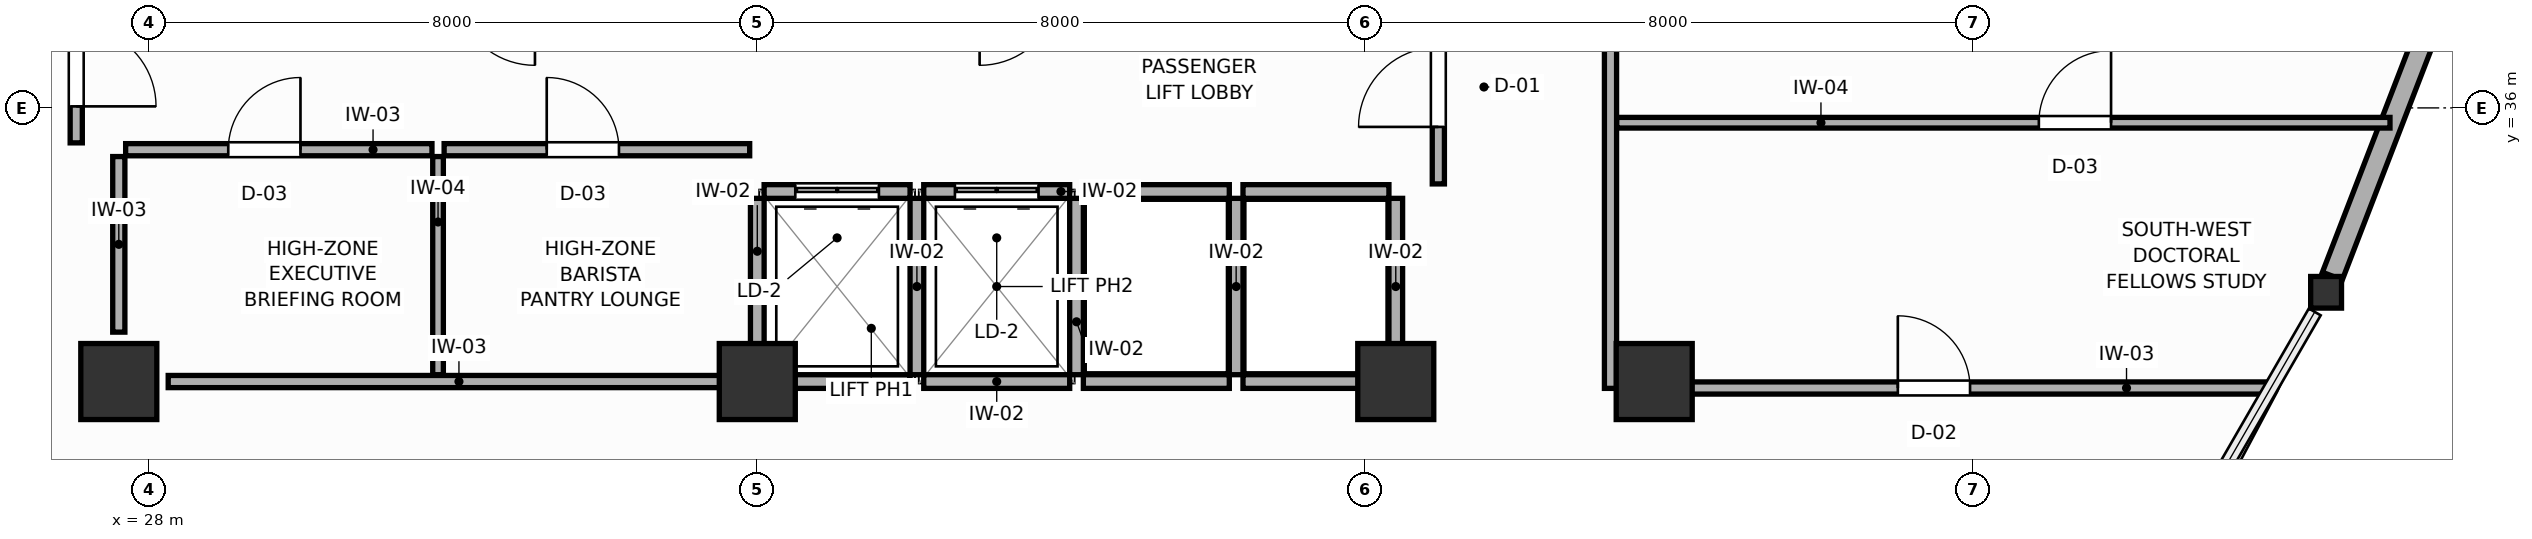
"""IFC4 building model, lengths in metres.
Left out: names, types, materials, properties, quantities, classifications, styles, units other than length and angle.
Written with IfcOpenShell. Run it as: python <this file> out.ifc"""

import sys

from ifc_helpers import new_model, si_unit, direction, frame, frame_2d, origin, origin_2d, place, context, subcontext, project, spatial, rectangle, i_section, extrude, source, transform, mapped, element, fill, save


model = new_model("IFC4")
c1 = context("Model", 3, precision=1e-05, world=origin(), true_north=direction((0.0, 1.0)))
c2 = subcontext(c1, "Body", "Model", "MODEL_VIEW")
j1 = project(units=[si_unit("LENGTHUNIT", "METRE"), si_unit("PLANEANGLEUNIT", "RADIAN")], contexts=[c1])
p1 = place(None, origin())
s1 = spatial("IfcSite", under=j1, at=p1, CompositionType="ELEMENT")
p2 = place(p1, origin())
s2 = spatial("IfcBuilding", under=s1, at=p2, CompositionType="ELEMENT")
p3 = place(p2, frame((0.0, 0.0, 220.2)))
s3 = spatial("IfcBuildingStorey", under=s2, at=p3, CompositionType="ELEMENT", Elevation=220.2)
m1 = source(origin(), c2, "Body", "SweptSolid", [
    extrude(rectangle(XDim=1.0, YDim=1.0, at=origin_2d()), origin(), (0.0, 0.0, 1.0), 3.6),
])
for number, where, z_axis, x_axis in (
    (1, (27.6, 32.4, 0.0), (0.0, 0.0, 1.0), (1.0, 0.0, 0.0)),
    (2, (44.4, 32.4, 0.0), (0.0, 0.0, 1.0), (1.0, 0.0, 0.0)),
    (3, (36.0, 32.4, 0.0), (0.0, 0.0, 1.0), (1.0, 0.0, 0.0)),
    (4, (47.8, 32.4, 0.0), (0.0, 0.0, 1.0), (1.0, 0.0, 0.0)),
):
    element("IfcColumn", number, at=place(p3, frame(where, z_axis=z_axis, x_axis=x_axis)), inside=s3, PredefinedType="COLUMN", context=c2, shape_type="MappedRepresentation", body=[
        mapped(m1, transform((0.0, 0.0, 0.0), scale=1.0)),
    ])
m2 = source(origin(), c2, "Body", "SweptSolid", [
    extrude(i_section(OverallWidth=0.406, OverallDepth=0.416, WebThickness=0.027, FlangeThickness=0.044, FilletRadius=0.015, at=origin_2d()), origin(), (0.0, 0.0, 1.0), 3.6),
])
p4 = place(p3, frame((56.639, 33.574, 0.0), z_axis=(0.0, 0.0, 1.0), x_axis=(1.0, 0.0, 0.0)))
e5 = element("IfcColumn", 5, at=p4, inside=s3, PredefinedType="COLUMN", context=c2, shape_type="MappedRepresentation", body=[
    mapped(m2, transform((0.0, 0.0, 0.0), scale=1.0)),
])
p5 = place(p3, frame((56.722, 33.787, 0.0), z_axis=(0.0, 0.0, 1.0), x_axis=(0.359972142588, 0.932963052088, 0.0)))
e6 = element("IfcWall", 6, at=p5, inside=s3, PredefinedType="SOLIDWALL", context=c2, shape_type="SweptSolid", body=[
    extrude(rectangle(XDim=13.621, YDim=0.28, at=frame_2d((6.811, 0.0))), origin(), (0.0, 0.0, 1.0), 3.02),
])
p6 = place(p5, frame((6.086, 0.0, 0.75)))
e7 = element("IfcOpeningElement", 7, at=p6, cuts=e6, PredefinedType="OPENING", context=c2, shape_type="SweptSolid", body=[
    extrude(rectangle(XDim=1.45, YDim=1.65, at=frame_2d((0.725, 0.825))), frame((0.0, 0.15, 0.0), z_axis=(0.0, -1.0, 0.0), x_axis=(1.0, 0.0, 0.0)), (0.0, 0.0, 1.0), 0.3),
])
p7 = place(p3, frame((36.09, 34.9, 0.0), z_axis=(0.0, 0.0, 1.0), x_axis=(1.0, 0.0, 0.0)))
e8 = element("IfcWall", 8, at=p7, inside=s3, PredefinedType="PARTITIONING", context=c2, shape_type="SweptSolid", body=[
    extrude(rectangle(XDim=1.92, YDim=0.18, at=frame_2d((0.96, 0.0))), origin(), (0.0, 0.0, 1.0), 3.41),
])
p8 = place(p7, frame((0.41, 0.0, 0.0)))
e9 = element("IfcOpeningElement", 9, at=p8, cuts=e8, PredefinedType="OPENING", context=c2, shape_type="SweptSolid", body=[
    extrude(rectangle(XDim=1.1, YDim=2.1, at=frame_2d((0.55, 1.05))), frame((0.0, 0.1, 0.0), z_axis=(0.0, -1.0, 0.0), x_axis=(1.0, 0.0, 0.0)), (0.0, 0.0, 1.0), 0.2),
])
p9 = place(p3, frame((36.09, 32.4, 0.0), z_axis=(0.0, 0.0, 1.0), x_axis=(1.0, 0.0, 0.0)))
e10 = element("IfcWall", 10, at=p9, inside=s3, PredefinedType="PARTITIONING", context=c2, shape_type="SweptSolid", body=[
    extrude(rectangle(XDim=1.92, YDim=0.18, at=frame_2d((0.96, 0.0))), origin(), (0.0, 0.0, 1.0), 2.96),
])
p10 = place(p3, frame((36.0, 32.49, 0.0), z_axis=(0.0, 0.0, 1.0), x_axis=(0.0, 1.0, 0.0)))
e11 = element("IfcWall", 11, at=p10, inside=s3, PredefinedType="PARTITIONING", context=c2, shape_type="SweptSolid", body=[
    extrude(rectangle(XDim=2.32, YDim=0.18, at=frame_2d((1.16, 0.0))), origin(), (0.0, 0.0, 1.0), 3.41),
])
p11 = place(p3, frame((38.19, 34.9, 0.0), z_axis=(0.0, 0.0, 1.0), x_axis=(1.0, 0.0, 0.0)))
e12 = element("IfcWall", 12, at=p11, inside=s3, PredefinedType="PARTITIONING", context=c2, shape_type="SweptSolid", body=[
    extrude(rectangle(XDim=1.92, YDim=0.18, at=frame_2d((0.96, 0.0))), origin(), (0.0, 0.0, 1.0), 3.41),
])
p12 = place(p11, frame((0.41, 0.0, 0.0)))
e13 = element("IfcOpeningElement", 13, at=p12, cuts=e12, PredefinedType="OPENING", context=c2, shape_type="SweptSolid", body=[
    extrude(rectangle(XDim=1.1, YDim=2.1, at=frame_2d((0.55, 1.05))), frame((0.0, 0.1, 0.0), z_axis=(0.0, -1.0, 0.0), x_axis=(1.0, 0.0, 0.0)), (0.0, 0.0, 1.0), 0.2),
])
p13 = place(p3, frame((38.19, 32.4, 0.0), z_axis=(0.0, 0.0, 1.0), x_axis=(1.0, 0.0, 0.0)))
e14 = element("IfcWall", 14, at=p13, inside=s3, PredefinedType="PARTITIONING", context=c2, shape_type="SweptSolid", body=[
    extrude(rectangle(XDim=1.92, YDim=0.18, at=frame_2d((0.96, 0.0))), origin(), (0.0, 0.0, 1.0), 2.96),
])
p14 = place(p3, frame((38.1, 32.49, 0.0), z_axis=(0.0, 0.0, 1.0), x_axis=(0.0, 1.0, 0.0)))
e15 = element("IfcWall", 15, at=p14, inside=s3, PredefinedType="PARTITIONING", context=c2, shape_type="SweptSolid", body=[
    extrude(rectangle(XDim=2.32, YDim=0.18, at=frame_2d((1.16, 0.0))), origin(), (0.0, 0.0, 1.0), 3.41),
])
p15 = place(p3, frame((40.29, 34.9, 0.0), z_axis=(0.0, 0.0, 1.0), x_axis=(1.0, 0.0, 0.0)))
e16 = element("IfcWall", 16, at=p15, inside=s3, PredefinedType="PARTITIONING", context=c2, shape_type="SweptSolid", body=[
    extrude(rectangle(XDim=1.92, YDim=0.18, at=frame_2d((0.96, 0.0))), origin(), (0.0, 0.0, 1.0), 3.41),
])
p16 = place(p3, frame((40.29, 32.4, 0.0), z_axis=(0.0, 0.0, 1.0), x_axis=(1.0, 0.0, 0.0)))
e17 = element("IfcWall", 17, at=p16, inside=s3, PredefinedType="PARTITIONING", context=c2, shape_type="SweptSolid", body=[
    extrude(rectangle(XDim=1.92, YDim=0.18, at=frame_2d((0.96, 0.0))), origin(), (0.0, 0.0, 1.0), 2.96),
])
p17 = place(p3, frame((40.2, 32.49, 0.0), z_axis=(0.0, 0.0, 1.0), x_axis=(0.0, 1.0, 0.0)))
e18 = element("IfcWall", 18, at=p17, inside=s3, PredefinedType="PARTITIONING", context=c2, shape_type="SweptSolid", body=[
    extrude(rectangle(XDim=2.32, YDim=0.18, at=frame_2d((1.16, 0.0))), origin(), (0.0, 0.0, 1.0), 3.41),
])
p18 = place(p3, frame((42.39, 34.9, 0.0), z_axis=(0.0, 0.0, 1.0), x_axis=(1.0, 0.0, 0.0)))
e19 = element("IfcWall", 19, at=p18, inside=s3, PredefinedType="PARTITIONING", context=c2, shape_type="SweptSolid", body=[
    extrude(rectangle(XDim=1.92, YDim=0.18, at=frame_2d((0.96, 0.0))), origin(), (0.0, 0.0, 1.0), 3.41),
])
p19 = place(p3, frame((42.39, 32.4, 0.0), z_axis=(0.0, 0.0, 1.0), x_axis=(1.0, 0.0, 0.0)))
e20 = element("IfcWall", 20, at=p19, inside=s3, PredefinedType="PARTITIONING", context=c2, shape_type="SweptSolid", body=[
    extrude(rectangle(XDim=1.92, YDim=0.18, at=frame_2d((0.96, 0.0))), origin(), (0.0, 0.0, 1.0), 2.96),
])
for number, where, z_axis, x_axis in (
    (21, (42.3, 32.49, 0.0), (0.0, 0.0, 1.0), (0.0, 1.0, 0.0)),
    (22, (44.4, 32.49, 0.0), (0.0, 0.0, 1.0), (0.0, 1.0, 0.0)),
):
    element("IfcWall", number, at=place(p3, frame(where, z_axis=z_axis, x_axis=x_axis)), inside=s3, PredefinedType="PARTITIONING", context=c2, shape_type="SweptSolid", body=[
        extrude(rectangle(XDim=2.32, YDim=0.18, at=frame_2d((1.16, 0.0))), origin(), (0.0, 0.0, 1.0), 3.41),
    ])
p20 = place(p3, frame((28.25, 32.4, 0.0), z_axis=(0.0, 0.0, 1.0), x_axis=(1.0, 0.0, 0.0)))
e23 = element("IfcWall", 23, at=p20, inside=s3, PredefinedType="PARTITIONING", context=c2, shape_type="SweptSolid", body=[
    extrude(rectangle(XDim=7.65, YDim=0.16, at=frame_2d((3.825, 0.0))), origin(), (0.0, 0.0, 1.0), 2.96),
])
p21 = place(p3, frame((27.6, 33.05, 0.0), z_axis=(0.0, 0.0, 1.0), x_axis=(0.0, 1.0, 0.0)))
e24 = element("IfcWall", 24, at=p21, inside=s3, PredefinedType="PARTITIONING", context=c2, shape_type="SweptSolid", body=[
    extrude(rectangle(XDim=2.31, YDim=0.16, at=frame_2d((1.155, 0.0))), origin(), (0.0, 0.0, 1.0), 3.41),
])
p22 = place(p3, frame((31.8, 32.49, 0.0), z_axis=(0.0, 0.0, 1.0), x_axis=(0.0, 1.0, 0.0)))
e25 = element("IfcWall", 25, at=p22, inside=s3, PredefinedType="PARTITIONING", context=c2, shape_type="SweptSolid", body=[
    extrude(rectangle(XDim=2.87, YDim=0.14, at=frame_2d((1.435, 0.0))), origin(), (0.0, 0.0, 1.0), 3.41),
])
p23 = place(p3, frame((27.69, 35.45, 0.0), z_axis=(0.0, 0.0, 1.0), x_axis=(1.0, 0.0, 0.0)))
e26 = element("IfcWall", 26, at=p23, inside=s3, PredefinedType="PARTITIONING", context=c2, shape_type="SweptSolid", body=[
    extrude(rectangle(XDim=4.03, YDim=0.16, at=frame_2d((2.015, 0.0))), origin(), (0.0, 0.0, 1.0), 3.41),
])
p24 = place(p23, frame((1.35, 0.0, 0.0)))
e27 = element("IfcOpeningElement", 27, at=p24, cuts=e26, PredefinedType="OPENING", context=c2, shape_type="SweptSolid", body=[
    extrude(rectangle(XDim=0.95, YDim=2.05, at=frame_2d((0.475, 1.025))), frame((0.0, 0.09, 0.0), z_axis=(0.0, -1.0, 0.0), x_axis=(1.0, 0.0, 0.0)), (0.0, 0.0, 1.0), 0.18),
])
p25 = place(p3, frame((31.88, 35.45, 0.0), z_axis=(0.0, 0.0, 1.0), x_axis=(1.0, 0.0, 0.0)))
e28 = element("IfcWall", 28, at=p25, inside=s3, PredefinedType="PARTITIONING", context=c2, shape_type="SweptSolid", body=[
    extrude(rectangle(XDim=4.02, YDim=0.16, at=frame_2d((2.01, 0.0))), origin(), (0.0, 0.0, 1.0), 3.41),
])
p26 = place(p25, frame((1.35, 0.0, 0.0)))
e29 = element("IfcOpeningElement", 29, at=p26, cuts=e28, PredefinedType="OPENING", context=c2, shape_type="SweptSolid", body=[
    extrude(rectangle(XDim=0.95, YDim=2.05, at=frame_2d((0.475, 1.025))), frame((0.0, 0.09, 0.0), z_axis=(0.0, -1.0, 0.0), x_axis=(1.0, 0.0, 0.0)), (0.0, 0.0, 1.0), 0.18),
])
p27 = place(p3, frame((27.04, 35.54, 0.0), z_axis=(0.0, 0.0, 1.0), x_axis=(0.0, 1.0, 0.0)))
e30 = element("IfcWall", 30, at=p27, inside=s3, PredefinedType="PARTITIONING", context=c2, shape_type="SweptSolid", body=[
    extrude(rectangle(XDim=2.11, YDim=0.16, at=frame_2d((1.055, 0.0))), origin(), (0.0, 0.0, 1.0), 3.41),
])
p28 = place(p27, frame((0.48, 0.0, 0.0)))
e31 = element("IfcOpeningElement", 31, at=p28, cuts=e30, PredefinedType="OPENING", context=c2, shape_type="SweptSolid", body=[
    extrude(rectangle(XDim=1.05, YDim=2.1, at=frame_2d((0.525, 1.05))), frame((0.0, 0.09, 0.0), z_axis=(0.0, -1.0, 0.0), x_axis=(1.0, 0.0, 0.0)), (0.0, 0.0, 1.0), 0.18),
])
p29 = place(p3, frame((44.96, 35.0, 0.0), z_axis=(0.0, 0.0, 1.0), x_axis=(0.0, 1.0, 0.0)))
e32 = element("IfcWall", 32, at=p29, inside=s3, PredefinedType="PARTITIONING", context=c2, shape_type="SweptSolid", body=[
    extrude(rectangle(XDim=2.65, YDim=0.16, at=frame_2d((1.325, 0.0))), origin(), (0.0, 0.0, 1.0), 3.41),
])
p30 = place(p29, frame((0.75, 0.0, 0.0)))
e33 = element("IfcOpeningElement", 33, at=p30, cuts=e32, PredefinedType="OPENING", context=c2, shape_type="SweptSolid", body=[
    extrude(rectangle(XDim=1.05, YDim=2.1, at=frame_2d((0.525, 1.05))), frame((0.0, 0.09, 0.0), z_axis=(0.0, -1.0, 0.0), x_axis=(1.0, 0.0, 0.0)), (0.0, 0.0, 1.0), 0.18),
])
p31 = place(p3, frame((47.225, 32.31, 0.0), z_axis=(0.0, 0.0, 1.0), x_axis=(0.0, 1.0, 0.0)))
e34 = element("IfcWall", 34, at=p31, inside=s3, PredefinedType="PARTITIONING", context=c2, shape_type="SweptSolid", body=[
    extrude(rectangle(XDim=18.978, YDim=0.16, at=frame_2d((9.489, 0.0))), origin(), (0.0, 0.0, 1.0), 3.41),
])
p32 = place(p3, frame((47.307, 32.315, 0.0), z_axis=(0.0, 0.0, 1.0), x_axis=(1.0, 0.0, 0.0)))
e35 = element("IfcWall", 35, at=p32, inside=s3, PredefinedType="PARTITIONING", context=c2, shape_type="SweptSolid", body=[
    extrude(rectangle(XDim=8.586, YDim=0.16, at=frame_2d((4.293, 0.0))), origin(), (0.0, 0.0, 1.0), 2.96),
])
p33 = place(p32, frame((3.698, 0.0, 0.0)))
e36 = element("IfcOpeningElement", 36, at=p33, cuts=e35, PredefinedType="OPENING", context=c2, shape_type="SweptSolid", body=[
    extrude(rectangle(XDim=0.95, YDim=2.05, at=frame_2d((0.475, 1.025))), frame((0.0, 0.09, 0.0), z_axis=(0.0, -1.0, 0.0), x_axis=(1.0, 0.0, 0.0)), (0.0, 0.0, 1.0), 0.18),
])
p34 = place(p3, frame((47.307, 35.805, 0.0), z_axis=(0.0, 0.0, 1.0), x_axis=(1.0, 0.0, 0.0)))
e37 = element("IfcWall", 37, at=p34, inside=s3, PredefinedType="PARTITIONING", context=c2, shape_type="SweptSolid", body=[
    extrude(rectangle(XDim=10.173, YDim=0.14, at=frame_2d((5.087, 0.0))), origin(), (0.0, 0.0, 1.0), 3.41),
])
p35 = place(p34, frame((5.553, 0.0, 0.0)))
e38 = element("IfcOpeningElement", 38, at=p35, cuts=e37, PredefinedType="OPENING", context=c2, shape_type="SweptSolid", body=[
    extrude(rectangle(XDim=0.95, YDim=2.05, at=frame_2d((0.475, 1.025))), frame((0.0, 0.08, 0.0), z_axis=(0.0, -1.0, 0.0), x_axis=(1.0, 0.0, 0.0)), (0.0, 0.0, 1.0), 0.16),
])
p36 = place(p8, origin())
e39 = element("IfcDoor", 39, at=p36, inside=s3, OperationType="DOUBLE_DOOR_SLIDING", PredefinedType="DOOR", context=c2, shape_type="SweptSolid", body=[
    extrude(rectangle(XDim=1.1, YDim=2.1, at=frame_2d((0.55, 1.05))), frame((0.0, 0.025, 0.0), z_axis=(0.0, -1.0, 0.0), x_axis=(1.0, 0.0, 0.0)), (0.0, 0.0, 1.0), 0.05),
])
fill(e9, e39)
p37 = place(p12, origin())
e40 = element("IfcDoor", 40, at=p37, inside=s3, OperationType="DOUBLE_DOOR_SLIDING", PredefinedType="DOOR", context=c2, shape_type="SweptSolid", body=[
    extrude(rectangle(XDim=1.1, YDim=2.1, at=frame_2d((0.55, 1.05))), frame((0.0, 0.025, 0.0), z_axis=(0.0, -1.0, 0.0), x_axis=(1.0, 0.0, 0.0)), (0.0, 0.0, 1.0), 0.05),
])
fill(e13, e40)
p38 = place(p24, origin())
e41 = element("IfcDoor", 41, at=p38, inside=s3, OperationType="SINGLE_SWING_RIGHT", PredefinedType="DOOR", context=c2, shape_type="SweptSolid", body=[
    extrude(rectangle(XDim=0.95, YDim=2.05, at=frame_2d((0.475, 1.025))), frame((0.0, 0.025, 0.0), z_axis=(0.0, -1.0, 0.0), x_axis=(1.0, 0.0, 0.0)), (0.0, 0.0, 1.0), 0.05),
])
fill(e27, e41)
p39 = place(p26, origin())
e42 = element("IfcDoor", 42, at=p39, inside=s3, OperationType="SINGLE_SWING_LEFT", PredefinedType="DOOR", context=c2, shape_type="SweptSolid", body=[
    extrude(rectangle(XDim=0.95, YDim=2.05, at=frame_2d((0.475, 1.025))), frame((0.0, 0.025, 0.0), z_axis=(0.0, -1.0, 0.0), x_axis=(1.0, 0.0, 0.0)), (0.0, 0.0, 1.0), 0.05),
])
fill(e29, e42)
p40 = place(p28, frame((1.05, 0.0, 0.0), z_axis=(0.0, 0.0, 1.0), x_axis=(-1.0, 0.0, 0.0)))
e43 = element("IfcDoor", 43, at=p40, inside=s3, OperationType="SINGLE_SWING_RIGHT", PredefinedType="DOOR", context=c2, shape_type="SweptSolid", body=[
    extrude(rectangle(XDim=1.05, YDim=2.1, at=frame_2d((0.525, 1.05))), frame((0.0, 0.025, 0.0), z_axis=(0.0, -1.0, 0.0), x_axis=(1.0, 0.0, 0.0)), (0.0, 0.0, 1.0), 0.05),
])
fill(e31, e43)
p41 = place(p30, origin())
e44 = element("IfcDoor", 44, at=p41, inside=s3, OperationType="SINGLE_SWING_LEFT", PredefinedType="DOOR", context=c2, shape_type="SweptSolid", body=[
    extrude(rectangle(XDim=1.05, YDim=2.1, at=frame_2d((0.525, 1.05))), frame((0.0, 0.025, 0.0), z_axis=(0.0, -1.0, 0.0), x_axis=(1.0, 0.0, 0.0)), (0.0, 0.0, 1.0), 0.05),
])
fill(e33, e44)
p42 = place(p33, origin())
e45 = element("IfcDoor", 45, at=p42, inside=s3, OperationType="SINGLE_SWING_LEFT", PredefinedType="DOOR", context=c2, shape_type="SweptSolid", body=[
    extrude(rectangle(XDim=0.95, YDim=2.05, at=frame_2d((0.475, 1.025))), frame((0.0, 0.025, 0.0), z_axis=(0.0, -1.0, 0.0), x_axis=(1.0, 0.0, 0.0)), (0.0, 0.0, 1.0), 0.05),
])
fill(e36, e45)
p43 = place(p35, origin())
e46 = element("IfcDoor", 46, at=p43, inside=s3, OperationType="SINGLE_SWING_RIGHT", PredefinedType="DOOR", context=c2, shape_type="SweptSolid", body=[
    extrude(rectangle(XDim=0.95, YDim=2.05, at=frame_2d((0.475, 1.025))), frame((0.0, 0.025, 0.0), z_axis=(0.0, -1.0, 0.0), x_axis=(1.0, 0.0, 0.0)), (0.0, 0.0, 1.0), 0.05),
])
fill(e38, e46)
save(model, sys.argv[1])
